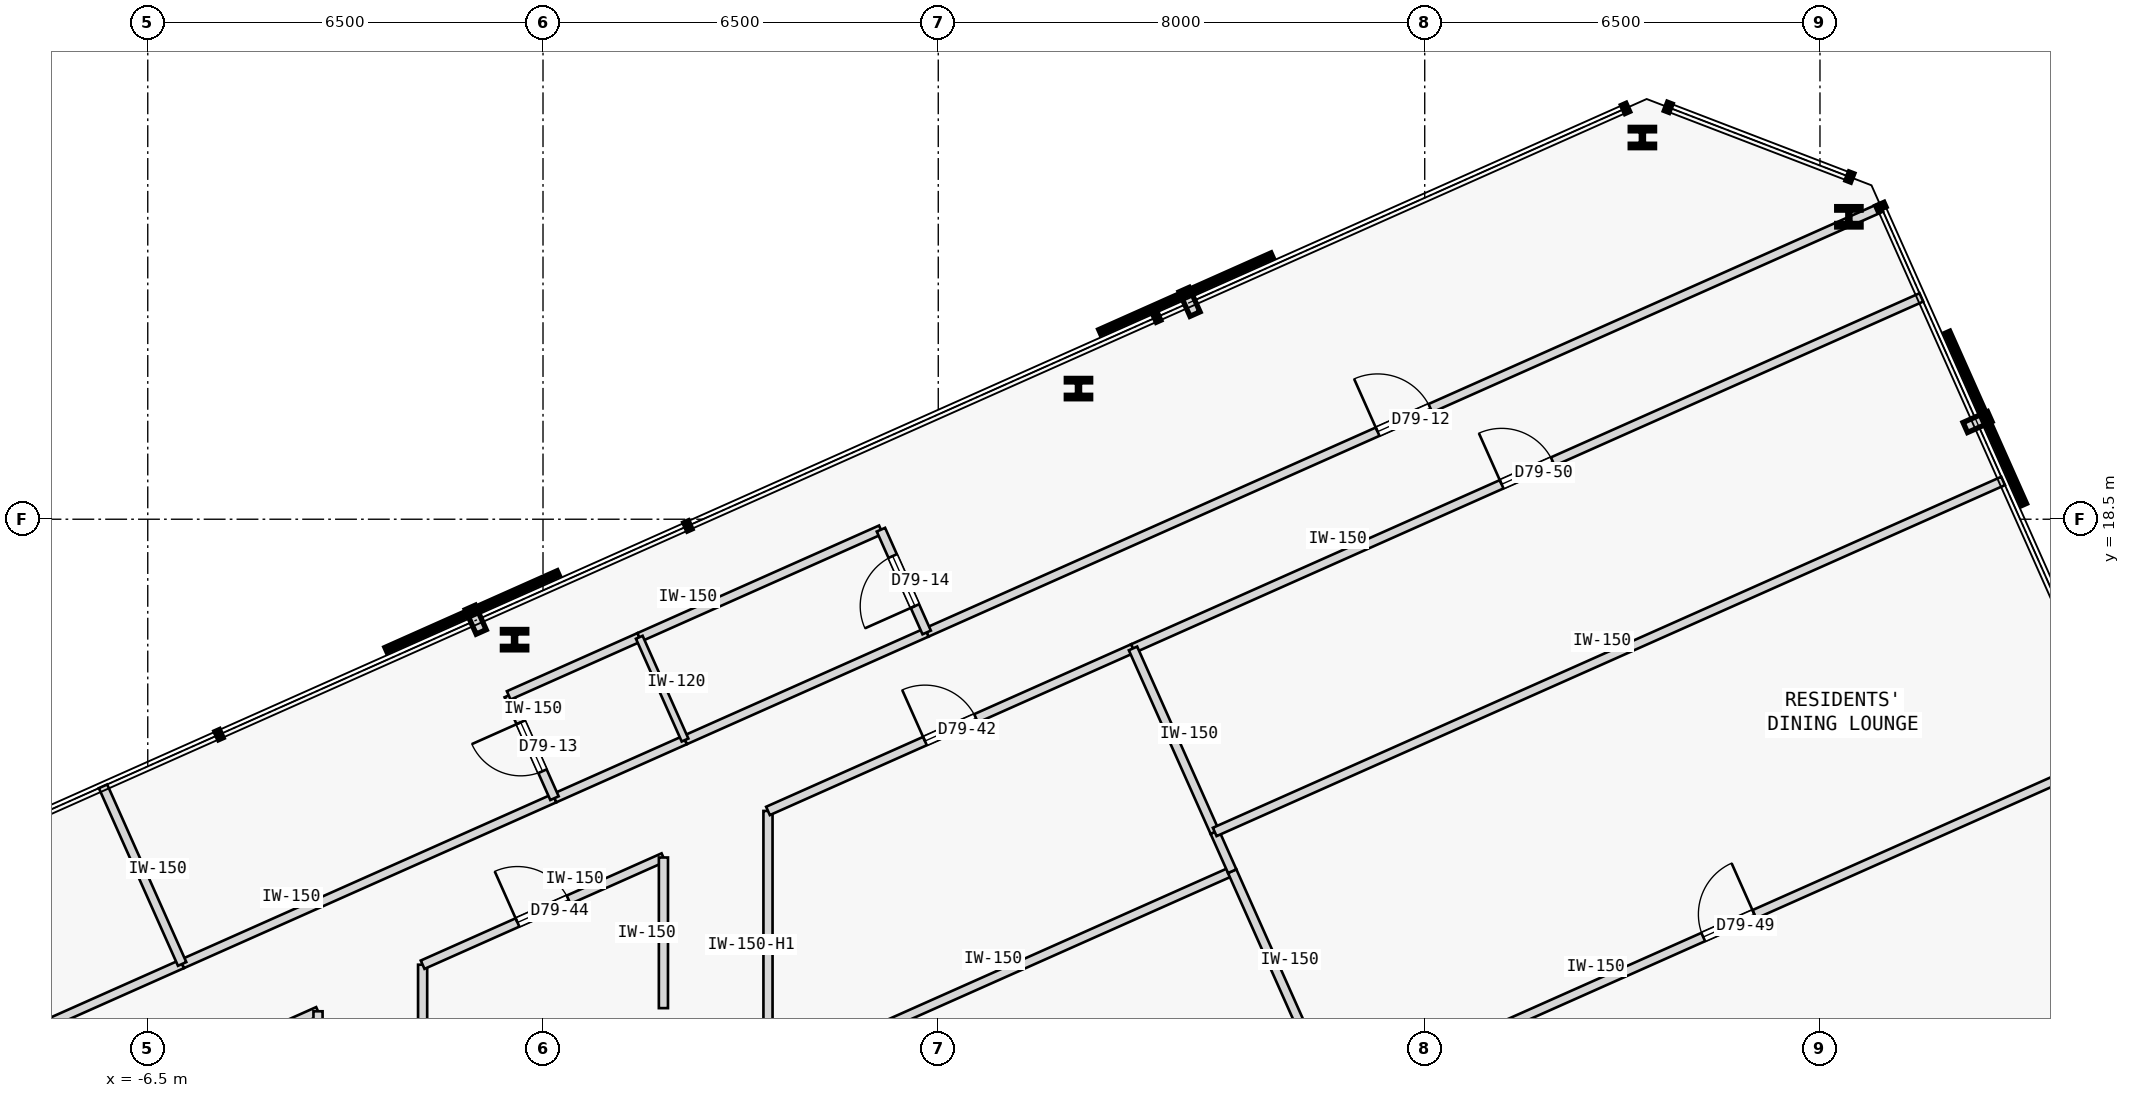
"""IFC4 building model, lengths in metres.
Left out: names, types, materials, properties, quantities, classifications, styles, units other than length and angle.
Written with IfcOpenShell. Run it as: python <this file> out.ifc"""

import sys

from ifc_helpers import new_model, si_unit, direction, frame, frame_2d, origin, origin_2d, place, context, subcontext, project, spatial, rectangle, i_section, extrude, element, fill, save


model = new_model("IFC4")
c1 = context("Model", 3, precision=1e-05, world=origin(), true_north=direction((0.0, 1.0)))
c2 = subcontext(c1, "Body", "Model", "MODEL_VIEW")
j1 = project(units=[si_unit("LENGTHUNIT", "METRE"), si_unit("PLANEANGLEUNIT", "RADIAN")], contexts=[c1])
p1 = place(None, origin())
s1 = spatial("IfcSite", under=j1, at=p1, CompositionType="ELEMENT")
p2 = place(p1, origin())
s2 = spatial("IfcBuilding", under=s1, at=p2, CompositionType="ELEMENT")
p3 = place(p2, frame((0.0, 0.0, 295.3)))
s3 = spatial("IfcBuildingStorey", under=s2, at=p3, CompositionType="ELEMENT", Elevation=295.3)
for number, where, z_axis, x_axis in (
    (1, (21.476, 23.473, 0.0), (0.0, 0.0, 1.0), (1.0, 0.0, 0.0)),
    (2, (18.08, 24.777, 0.0), (0.0, 0.0, 1.0), (1.0, 0.0, 0.0)),
    (3, (8.806, 20.648, 0.0), (0.0, 0.0, 1.0), (1.0, 0.0, 0.0)),
    (4, (-0.468, 16.519, 0.0), (0.0, 0.0, 1.0), (1.0, 0.0, 0.0)),
):
    element("IfcColumn", number, at=place(p3, frame(where, z_axis=z_axis, x_axis=x_axis)), inside=s3, PredefinedType="COLUMN", context=c2, shape_type="SweptSolid", body=[
        extrude(i_section(OverallWidth=0.401, OverallDepth=0.335, WebThickness=0.036, FlangeThickness=0.058, FilletRadius=0.015, at=origin_2d()), origin(), (0.0, 0.0, 1.0), 3.35),
    ])
p4 = place(p3, frame((-18.549, 5.57, 0.0), z_axis=(0.0, 0.0, 1.0), x_axis=(0.913545955058, 0.40673552586, 0.0)))
e5 = element("IfcWall", 5, at=p4, inside=s3, PredefinedType="PARTITIONING", context=c2, shape_type="SweptSolid", body=[
    extrude(rectangle(XDim=13.808, YDim=0.15, at=frame_2d((6.904, 0.0))), origin(), (0.0, 0.0, 1.0), 3.125),
])
p5 = place(p4, frame((6.429, 0.0, 0.0)))
e6 = element("IfcOpeningElement", 6, at=p5, cuts=e5, PredefinedType="OPENING", context=c2, shape_type="SweptSolid", body=[
    extrude(rectangle(XDim=0.95, YDim=2.15, at=frame_2d((0.475, 1.075))), frame((0.0, 0.085, 0.0), z_axis=(0.0, -1.0, 0.0), x_axis=(1.0, 0.0, 0.0)), (0.0, 0.0, 1.0), 0.17),
])
p6 = place(p3, frame((-5.935, 11.187, 0.0), z_axis=(0.0, 0.0, 1.0), x_axis=(0.91354851465, 0.406729776856, 0.0)))
e7 = element("IfcWall", 7, at=p6, inside=s3, PredefinedType="PARTITIONING", context=c2, shape_type="SweptSolid", body=[
    extrude(rectangle(XDim=6.703, YDim=0.15, at=frame_2d((3.352, 0.0))), origin(), (0.0, 0.0, 1.0), 3.125),
])
p7 = place(p3, frame((6.31, 16.638, 0.0), z_axis=(0.0, 0.0, 1.0), x_axis=(0.913550659227, 0.406724959925, 0.0)))
e8 = element("IfcWall", 8, at=p7, inside=s3, PredefinedType="PARTITIONING", context=c2, shape_type="SweptSolid", body=[
    extrude(rectangle(XDim=17.185, YDim=0.15, at=frame_2d((8.592, 0.0))), origin(), (0.0, 0.0, 1.0), 3.125),
])
p8 = place(p7, frame((8.117, 0.0, 0.0)))
e9 = element("IfcOpeningElement", 9, at=p8, cuts=e8, PredefinedType="OPENING", context=c2, shape_type="SweptSolid", body=[
    extrude(rectangle(XDim=0.95, YDim=2.15, at=frame_2d((0.475, 1.075))), frame((0.0, 0.085, 0.0), z_axis=(0.0, -1.0, 0.0), x_axis=(1.0, 0.0, 0.0)), (0.0, 0.0, 1.0), 0.17),
])
p9 = place(p3, frame((0.189, 13.913, 0.0), z_axis=(0.0, 0.0, 1.0), x_axis=(0.913520021435, 0.406793768926, 0.0)))
e10 = element("IfcWall", 10, at=p9, inside=s3, PredefinedType="PARTITIONING", context=c2, shape_type="SweptSolid", body=[
    extrude(rectangle(XDim=2.35, YDim=0.15, at=frame_2d((1.175, 0.0))), origin(), (0.0, 0.0, 1.0), 3.125),
])
p10 = place(p3, frame((2.336, 14.869, 0.0), z_axis=(0.0, 0.0, 1.0), x_axis=(0.913545193015, 0.406737237438, 0.0)))
e11 = element("IfcWall", 11, at=p10, inside=s3, PredefinedType="PARTITIONING", context=c2, shape_type="SweptSolid", body=[
    extrude(rectangle(XDim=4.35, YDim=0.15, at=frame_2d((2.175, 0.0))), origin(), (0.0, 0.0, 1.0), 3.125),
])
p11 = place(p3, frame((3.7, 9.313, 0.0), z_axis=(0.0, 0.0, 1.0), x_axis=(-0.000111240891, 0.999999993813, 0.0)))
e12 = element("IfcWall", 12, at=p11, inside=s3, PredefinedType="PARTITIONING", context=c2, shape_type="SweptSolid", body=[
    extrude(rectangle(XDim=4.389, YDim=0.15, at=frame_2d((2.195, 0.0))), origin(), (0.0, 0.0, 1.0), 2.675),
])
p12 = place(p3, frame((3.7, 13.703, 0.0), z_axis=(0.0, 0.0, 1.0), x_axis=(0.913549363376, 0.406727870542, 0.0)))
e13 = element("IfcWall", 13, at=p12, inside=s3, PredefinedType="PARTITIONING", context=c2, shape_type="SweptSolid", body=[
    extrude(rectangle(XDim=6.571, YDim=0.15, at=frame_2d((3.286, 0.0))), origin(), (0.0, 0.0, 1.0), 3.125),
])
p13 = place(p12, frame((2.825, 0.0, 0.0)))
e14 = element("IfcOpeningElement", 14, at=p13, cuts=e13, PredefinedType="OPENING", context=c2, shape_type="SweptSolid", body=[
    extrude(rectangle(XDim=0.92, YDim=2.15, at=frame_2d((0.46, 1.075))), frame((0.0, 0.085, 0.0), z_axis=(0.0, -1.0, 0.0), x_axis=(1.0, 0.0, 0.0)), (0.0, 0.0, 1.0), 0.17),
])
p14 = place(p3, frame((-1.98, 8.697, 0.0), z_axis=(0.0, 0.0, 1.0), x_axis=(0.000197102588, 0.999999980575, 0.0)))
e15 = element("IfcWall", 15, at=p14, inside=s3, PredefinedType="PARTITIONING", context=c2, shape_type="SweptSolid", body=[
    extrude(rectangle(XDim=2.477, YDim=0.15, at=frame_2d((1.239, 0.0))), origin(), (0.0, 0.0, 1.0), 2.675),
])
p15 = place(p3, frame((-1.98, 11.174, 0.0), z_axis=(0.0, 0.0, 1.0), x_axis=(0.913546598225, 0.406734081276, 0.0)))
e16 = element("IfcWall", 16, at=p15, inside=s3, PredefinedType="PARTITIONING", context=c2, shape_type="SweptSolid", body=[
    extrude(rectangle(XDim=4.335, YDim=0.15, at=frame_2d((2.167, 0.0))), origin(), (0.0, 0.0, 1.0), 3.125),
])
p16 = place(p15, frame((1.708, 0.0, 0.0)))
e17 = element("IfcOpeningElement", 17, at=p16, cuts=e16, PredefinedType="OPENING", context=c2, shape_type="SweptSolid", body=[
    extrude(rectangle(XDim=0.92, YDim=2.15, at=frame_2d((0.46, 1.075))), frame((0.0, 0.085, 0.0), z_axis=(0.0, -1.0, 0.0), x_axis=(1.0, 0.0, 0.0)), (0.0, 0.0, 1.0), 0.17),
])
p17 = place(p3, frame((1.98, 10.46, 0.0), z_axis=(0.0, 0.0, 1.0), x_axis=(0.000197102588, 0.999999980575, 0.0)))
e18 = element("IfcWall", 18, at=p17, inside=s3, PredefinedType="PARTITIONING", context=c2, shape_type="SweptSolid", body=[
    extrude(rectangle(XDim=2.477, YDim=0.15, at=frame_2d((1.239, 0.0))), origin(), (0.0, 0.0, 1.0), 3.125),
])
p18 = place(p3, frame((-7.372, 8.774, 0.0), z_axis=(0.0, 0.0, 1.0), x_axis=(0.913563383118, 0.406696379412, 0.0)))
e19 = element("IfcWall", 19, at=p18, inside=s3, PredefinedType="PARTITIONING", context=c2, shape_type="SweptSolid", body=[
    extrude(rectangle(XDim=4.019, YDim=0.15, at=frame_2d((2.01, 0.0))), origin(), (0.0, 0.0, 1.0), 3.125),
])
p19 = place(p3, frame((-3.7, 5.6, 0.0), z_axis=(0.0, 0.0, 1.0), x_axis=(5.077173e-05, 0.999999998711, 0.0)))
e20 = element("IfcWall", 20, at=p19, inside=s3, PredefinedType="PARTITIONING", context=c2, shape_type="SweptSolid", body=[
    extrude(rectangle(XDim=4.809, YDim=0.15, at=frame_2d((2.404, 0.0))), origin(), (0.0, 0.0, 1.0), 3.125),
])
p20 = place(p19, frame((1.944, 0.0, 0.0)))
e21 = element("IfcOpeningElement", 21, at=p20, cuts=e20, PredefinedType="OPENING", context=c2, shape_type="SweptSolid", body=[
    extrude(rectangle(XDim=0.92, YDim=2.15, at=frame_2d((0.46, 1.075))), frame((0.0, 0.085, 0.0), z_axis=(0.0, -1.0, 0.0), x_axis=(1.0, 0.0, 0.0)), (0.0, 0.0, 1.0), 0.17),
])
p21 = place(p3, frame((9.703, 16.375, 0.0), z_axis=(0.0, 0.0, 1.0), x_axis=(0.913544622417, 0.406738519018, 0.0)))
e22 = element("IfcWall", 22, at=p21, inside=s3, PredefinedType="PARTITIONING", context=c2, shape_type="SweptSolid", body=[
    extrude(rectangle(XDim=14.192, YDim=0.15, at=frame_2d((7.096, 0.0))), origin(), (0.0, 0.0, 1.0), 3.125),
])
p22 = place(p21, frame((6.636, 0.0, 0.0)))
e23 = element("IfcOpeningElement", 23, at=p22, cuts=e22, PredefinedType="OPENING", context=c2, shape_type="SweptSolid", body=[
    extrude(rectangle(XDim=0.92, YDim=2.15, at=frame_2d((0.46, 1.075))), frame((0.0, 0.085, 0.0), z_axis=(0.0, -1.0, 0.0), x_axis=(1.0, 0.0, 0.0)), (0.0, 0.0, 1.0), 0.17),
])
p23 = place(p3, frame((-5.935, 11.187, 0.0), z_axis=(0.0, 0.0, 1.0), x_axis=(-0.406733350739, 0.913546923478, 0.0)))
e24 = element("IfcWall", 24, at=p23, inside=s3, PredefinedType="PARTITIONING", context=c2, shape_type="SweptSolid", body=[
    extrude(rectangle(XDim=3.198, YDim=0.15, at=frame_2d((1.599, 0.0))), origin(), (0.0, 0.0, 1.0), 3.125),
])
p24 = place(p3, frame((0.189, 13.913, 0.0), z_axis=(0.0, 0.0, 1.0), x_axis=(-0.406701600856, 0.913561058639, 0.0)))
e25 = element("IfcWall", 25, at=p24, inside=s3, PredefinedType="PARTITIONING", context=c2, shape_type="SweptSolid", body=[
    extrude(rectangle(XDim=1.85, YDim=0.15, at=frame_2d((0.925, 0.0))), origin(), (0.0, 0.0, 1.0), 3.125),
])
p25 = place(p24, frame((0.485, 0.0, 0.0)))
e26 = element("IfcOpeningElement", 26, at=p25, cuts=e25, PredefinedType="OPENING", context=c2, shape_type="SweptSolid", body=[
    extrude(rectangle(XDim=0.88, YDim=2.15, at=frame_2d((0.44, 1.075))), frame((0.0, 0.085, 0.0), z_axis=(0.0, -1.0, 0.0), x_axis=(1.0, 0.0, 0.0)), (0.0, 0.0, 1.0), 0.17),
])
p26 = place(p3, frame((-0.564, 15.603, 0.0), z_axis=(0.0, 0.0, 1.0), x_axis=(0.913541436194, 0.406745675276, 0.0)))
e27 = element("IfcWall", 27, at=p26, inside=s3, PredefinedType="PARTITIONING", context=c2, shape_type="SweptSolid", body=[
    extrude(rectangle(XDim=2.35, YDim=0.15, at=frame_2d((1.175, 0.0))), origin(), (0.0, 0.0, 1.0), 3.125),
])
p27 = place(p3, frame((1.583, 16.559, 0.0), z_axis=(0.0, 0.0, 1.0), x_axis=(0.913554477336, 0.406716383908, 0.0)))
e28 = element("IfcWall", 28, at=p27, inside=s3, PredefinedType="PARTITIONING", context=c2, shape_type="SweptSolid", body=[
    extrude(rectangle(XDim=4.35, YDim=0.15, at=frame_2d((2.175, 0.0))), origin(), (0.0, 0.0, 1.0), 3.125),
])
p28 = place(p3, frame((6.31, 16.638, 0.0), z_axis=(0.0, 0.0, 1.0), x_axis=(-0.406750635596, 0.913539227643, 0.0)))
e29 = element("IfcWall", 29, at=p28, inside=s3, PredefinedType="PARTITIONING", context=c2, shape_type="SweptSolid", body=[
    extrude(rectangle(XDim=1.85, YDim=0.15, at=frame_2d((0.925, 0.0))), origin(), (0.0, 0.0, 1.0), 3.125),
])
p29 = place(p28, frame((0.475, 0.0, 0.0)))
e30 = element("IfcOpeningElement", 30, at=p29, cuts=e29, PredefinedType="OPENING", context=c2, shape_type="SweptSolid", body=[
    extrude(rectangle(XDim=0.9, YDim=2.15, at=frame_2d((0.45, 1.075))), frame((0.0, 0.085, 0.0), z_axis=(0.0, -1.0, 0.0), x_axis=(1.0, 0.0, 0.0)), (0.0, 0.0, 1.0), 0.17),
])
p30 = place(p3, frame((2.336, 14.869, 0.0), z_axis=(0.0, 0.0, 1.0), x_axis=(-0.406860767979, 0.913490183571, 0.0)))
e31 = element("IfcWall", 31, at=p30, inside=s3, PredefinedType="PARTITIONING", context=c2, shape_type="SweptSolid", body=[
    extrude(rectangle(XDim=1.85, YDim=0.12, at=frame_2d((0.925, 0.0))), origin(), (0.0, 0.0, 1.0), 3.125),
])
p31 = place(p3, frame((3.7, 9.313, 0.0), z_axis=(0.0, 0.0, 1.0), x_axis=(0.913545080962, 0.406737489112, 0.0)))
e32 = element("IfcWall", 32, at=p31, inside=s3, PredefinedType="PARTITIONING", context=c2, shape_type="SweptSolid", body=[
    extrude(rectangle(XDim=8.356, YDim=0.15, at=frame_2d((4.178, 0.0))), origin(), (0.0, 0.0, 1.0), 3.125),
])
p32 = place(p3, frame((12.725, 9.587, 0.0), z_axis=(0.0, 0.0, 1.0), x_axis=(-0.406714462948, 0.913555332549, 0.0)))
e33 = element("IfcWall", 33, at=p32, inside=s3, PredefinedType="PARTITIONING", context=c2, shape_type="SweptSolid", body=[
    extrude(rectangle(XDim=3.421, YDim=0.15, at=frame_2d((1.71, 0.0))), origin(), (0.0, 0.0, 1.0), 3.125),
])
p33 = place(p3, frame((11.334, 12.712, 0.0), z_axis=(0.0, 0.0, 1.0), x_axis=(-0.40694029237, 0.913454759934, 0.0)))
e34 = element("IfcWall", 34, at=p33, inside=s3, PredefinedType="PARTITIONING", context=c2, shape_type="SweptSolid", body=[
    extrude(rectangle(XDim=0.706, YDim=0.15, at=frame_2d((0.353, 0.0))), origin(), (0.0, 0.0, 1.0), 3.125),
])
p34 = place(p3, frame((11.046, 13.357, 0.0), z_axis=(0.0, 0.0, 1.0), x_axis=(-0.406714303965, 0.913555403328, 0.0)))
e35 = element("IfcWall", 35, at=p34, inside=s3, PredefinedType="PARTITIONING", context=c2, shape_type="SweptSolid", body=[
    extrude(rectangle(XDim=3.304, YDim=0.15, at=frame_2d((1.652, 0.0))), origin(), (0.0, 0.0, 1.0), 3.125),
])
p35 = place(p3, frame((13.018, 8.93, 0.0), z_axis=(0.0, 0.0, 1.0), x_axis=(0.913551014388, 0.406724162191, 0.0)))
e36 = element("IfcWall", 36, at=p35, inside=s3, PredefinedType="PARTITIONING", context=c2, shape_type="SweptSolid", body=[
    extrude(rectangle(XDim=14.192, YDim=0.15, at=frame_2d((7.096, 0.0))), origin(), (0.0, 0.0, 1.0), 3.125),
])
p36 = place(p35, frame((6.636, 0.0, 0.0)))
e37 = element("IfcOpeningElement", 37, at=p36, cuts=e36, PredefinedType="OPENING", context=c2, shape_type="SweptSolid", body=[
    extrude(rectangle(XDim=0.92, YDim=2.15, at=frame_2d((0.46, 1.075))), frame((0.0, 0.085, 0.0), z_axis=(0.0, -1.0, 0.0), x_axis=(1.0, 0.0, 0.0)), (0.0, 0.0, 1.0), 0.17),
])
p37 = place(p3, frame((11.046, 13.357, 0.0), z_axis=(0.0, 0.0, 1.0), x_axis=(0.913553860075, 0.406717770379, 0.0)))
e38 = element("IfcWall", 38, at=p37, inside=s3, PredefinedType="PARTITIONING", context=c2, shape_type="SweptSolid", body=[
    extrude(rectangle(XDim=14.192, YDim=0.15, at=frame_2d((7.096, 0.0))), origin(), (0.0, 0.0, 1.0), 3.125),
])
p38 = place(p8, origin())
e39 = element("IfcDoor", 39, at=p38, inside=s3, OperationType="SINGLE_SWING_LEFT", PredefinedType="DOOR", context=c2, shape_type="SweptSolid", body=[
    extrude(rectangle(XDim=0.95, YDim=2.15, at=frame_2d((0.475, 1.075))), frame((0.0, 0.025, 0.0), z_axis=(0.0, -1.0, 0.0), x_axis=(1.0, 0.0, 0.0)), (0.0, 0.0, 1.0), 0.05),
])
fill(e9, e39)
p39 = place(p25, origin())
e40 = element("IfcDoor", 40, at=p39, inside=s3, OperationType="SINGLE_SWING_RIGHT", PredefinedType="DOOR", context=c2, shape_type="SweptSolid", body=[
    extrude(rectangle(XDim=0.88, YDim=2.15, at=frame_2d((0.44, 1.075))), frame((0.0, 0.025, 0.0), z_axis=(0.0, -1.0, 0.0), x_axis=(1.0, 0.0, 0.0)), (0.0, 0.0, 1.0), 0.05),
])
fill(e26, e40)
p40 = place(p29, origin())
e41 = element("IfcDoor", 41, at=p40, inside=s3, OperationType="SINGLE_SWING_LEFT", PredefinedType="DOOR", context=c2, shape_type="SweptSolid", body=[
    extrude(rectangle(XDim=0.9, YDim=2.15, at=frame_2d((0.45, 1.075))), frame((0.0, 0.025, 0.0), z_axis=(0.0, -1.0, 0.0), x_axis=(1.0, 0.0, 0.0)), (0.0, 0.0, 1.0), 0.05),
])
fill(e30, e41)
p41 = place(p13, origin())
e42 = element("IfcDoor", 42, at=p41, inside=s3, OperationType="SINGLE_SWING_LEFT", PredefinedType="DOOR", context=c2, shape_type="SweptSolid", body=[
    extrude(rectangle(XDim=0.92, YDim=2.15, at=frame_2d((0.46, 1.075))), frame((0.0, 0.025, 0.0), z_axis=(0.0, -1.0, 0.0), x_axis=(1.0, 0.0, 0.0)), (0.0, 0.0, 1.0), 0.05),
])
fill(e14, e42)
p42 = place(p16, origin())
e43 = element("IfcDoor", 43, at=p42, inside=s3, OperationType="SINGLE_SWING_LEFT", PredefinedType="DOOR", context=c2, shape_type="SweptSolid", body=[
    extrude(rectangle(XDim=0.92, YDim=2.15, at=frame_2d((0.46, 1.075))), frame((0.0, 0.025, 0.0), z_axis=(0.0, -1.0, 0.0), x_axis=(1.0, 0.0, 0.0)), (0.0, 0.0, 1.0), 0.05),
])
fill(e17, e43)
p43 = place(p36, origin())
e44 = element("IfcDoor", 44, at=p43, inside=s3, OperationType="SINGLE_SWING_RIGHT", PredefinedType="DOOR", context=c2, shape_type="SweptSolid", body=[
    extrude(rectangle(XDim=0.92, YDim=2.15, at=frame_2d((0.46, 1.075))), frame((0.0, 0.025, 0.0), z_axis=(0.0, -1.0, 0.0), x_axis=(1.0, 0.0, 0.0)), (0.0, 0.0, 1.0), 0.05),
])
fill(e37, e44)
p44 = place(p22, origin())
e45 = element("IfcDoor", 45, at=p44, inside=s3, OperationType="SINGLE_SWING_LEFT", PredefinedType="DOOR", context=c2, shape_type="SweptSolid", body=[
    extrude(rectangle(XDim=0.92, YDim=2.15, at=frame_2d((0.46, 1.075))), frame((0.0, 0.025, 0.0), z_axis=(0.0, -1.0, 0.0), x_axis=(1.0, 0.0, 0.0)), (0.0, 0.0, 1.0), 0.05),
])
fill(e23, e45)
save(model, sys.argv[1])
